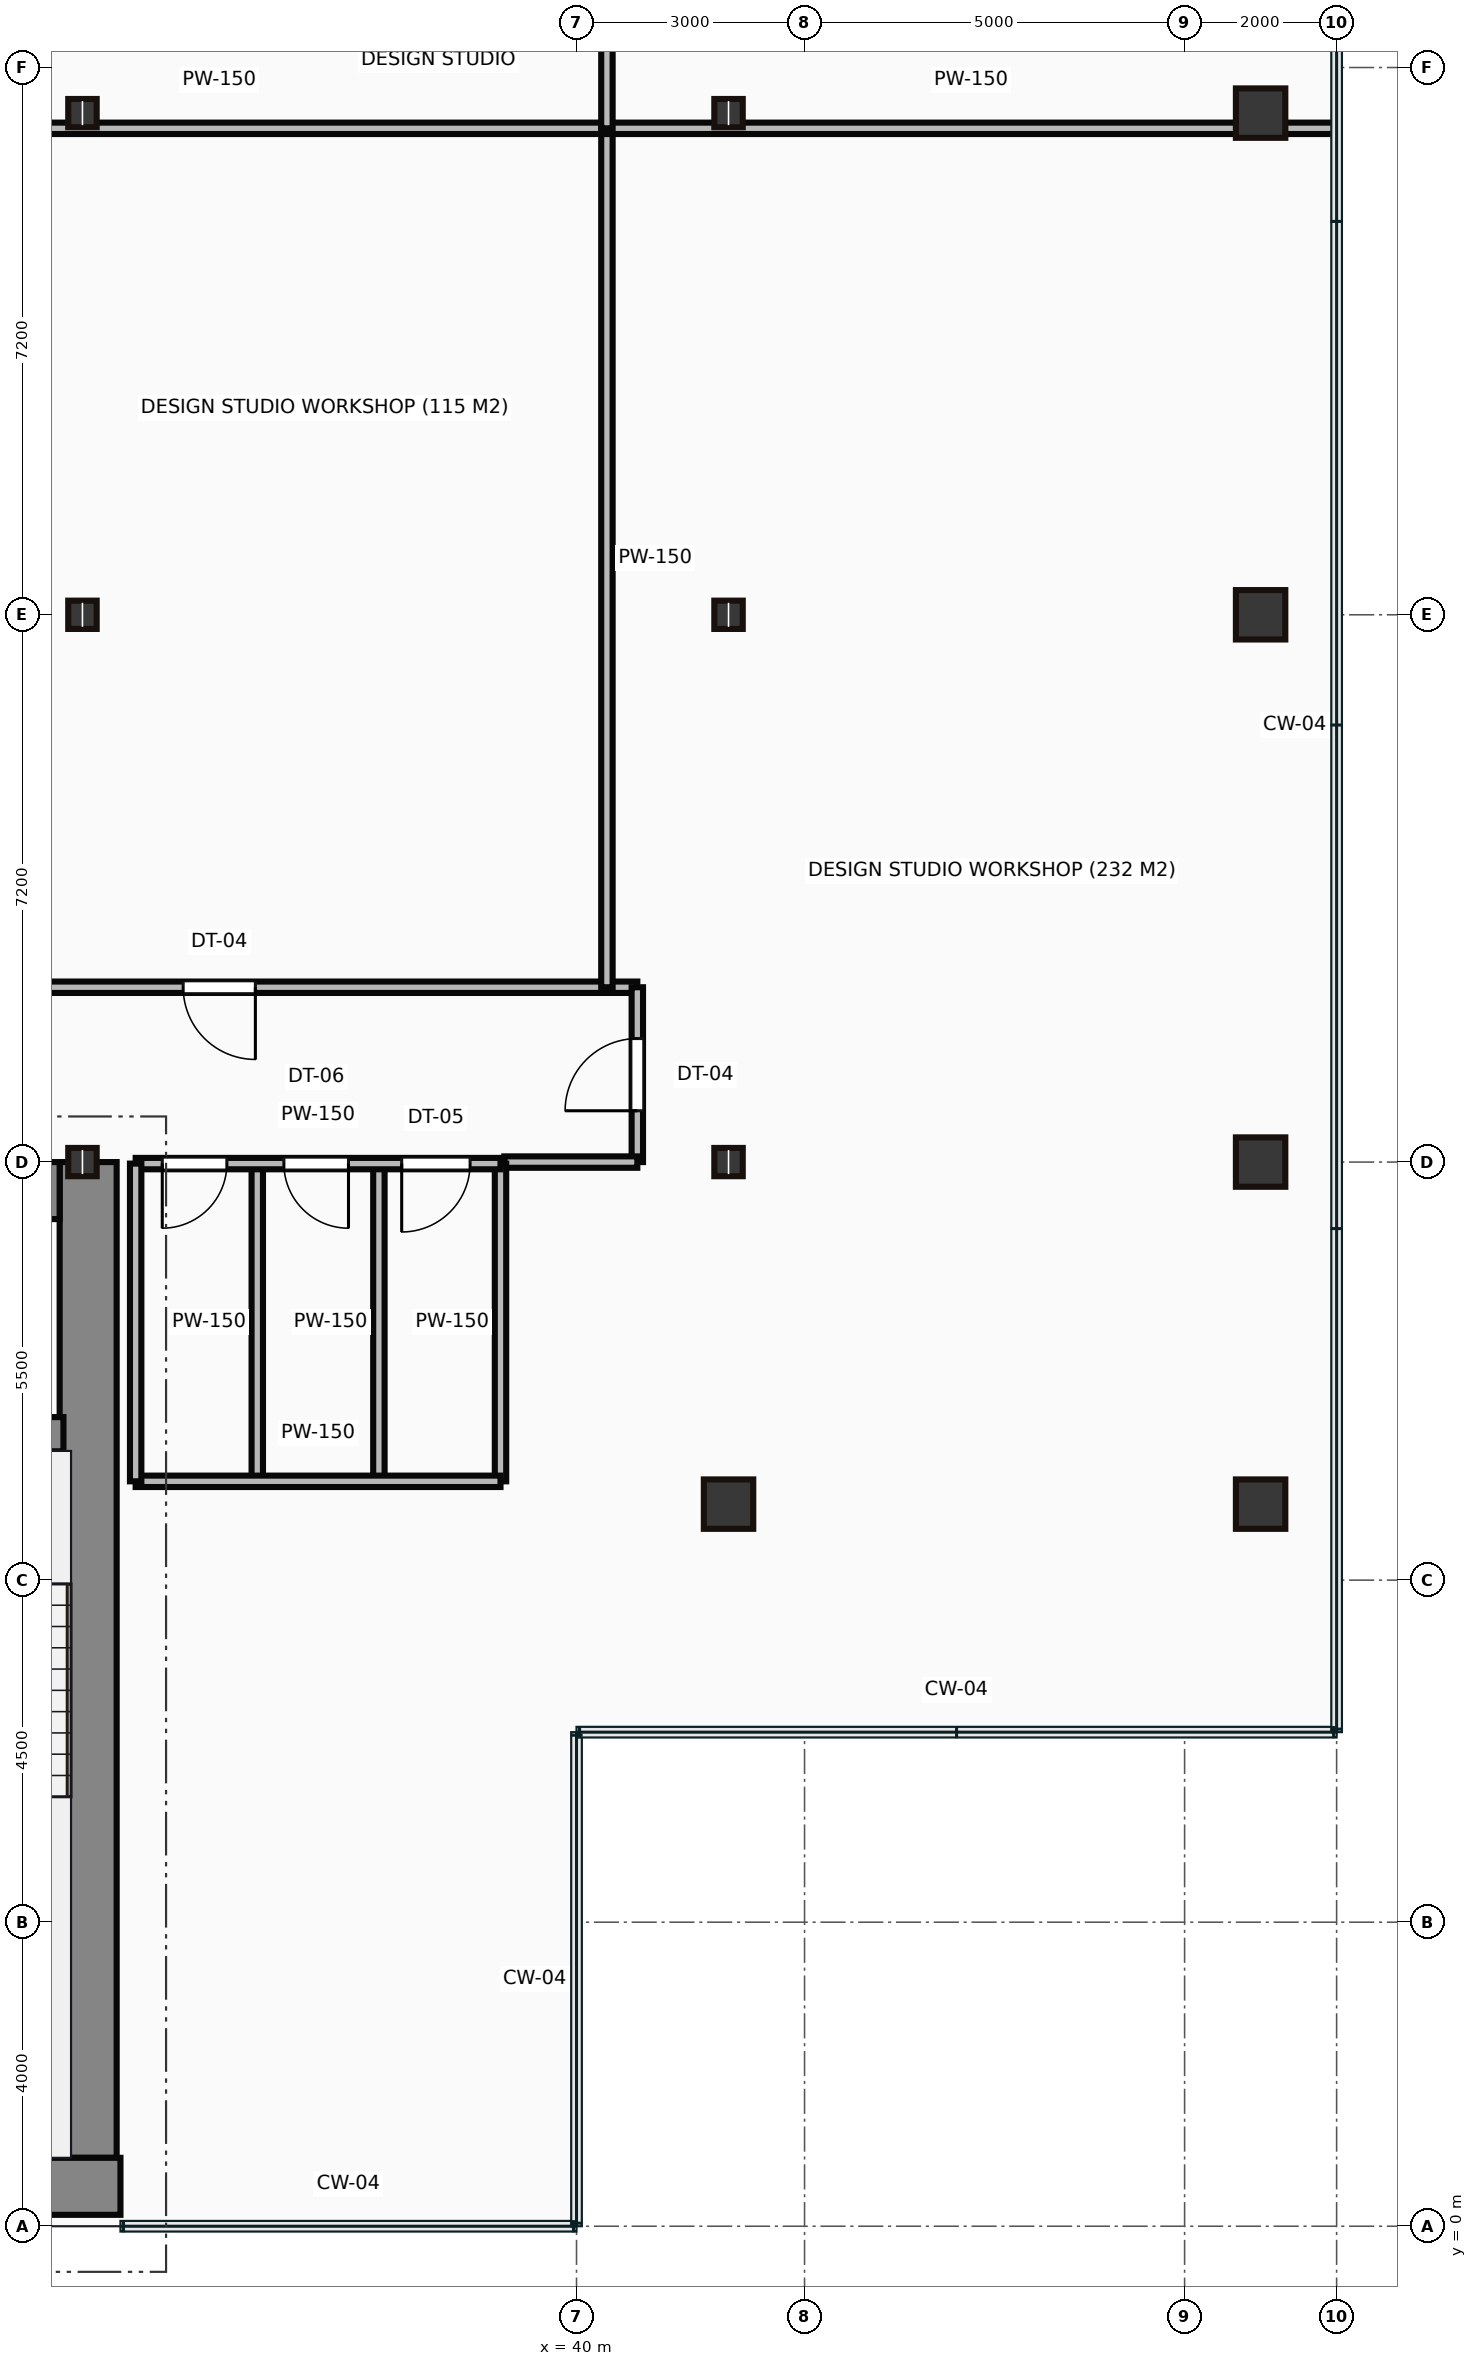
"""IFC4 building model, lengths in metres.
Left out: names, types, materials, properties, quantities, classifications, styles, units other than length and angle.
Written with IfcOpenShell. Run it as: python <this file> out.ifc"""

import sys

from ifc_helpers import new_model, si_unit, direction, frame, frame_2d, origin, origin_2d, place, context, subcontext, project, spatial, rectangle, hollow_rectangle, i_section, extrude, source, transform, mapped, element, fill, save


model = new_model("IFC4")
c1 = context("Model", 3, precision=1e-05, world=origin(), true_north=direction((0.0, 1.0)))
c2 = subcontext(c1, "Body", "Model", "MODEL_VIEW")
j1 = project(units=[si_unit("LENGTHUNIT", "METRE"), si_unit("PLANEANGLEUNIT", "RADIAN")], contexts=[c1])
p1 = place(None, origin())
s1 = spatial("IfcSite", under=j1, at=p1, CompositionType="ELEMENT")
p2 = place(p1, origin())
s2 = spatial("IfcBuilding", under=s1, at=p2, CompositionType="ELEMENT")
p3 = place(p2, frame((0.0, 0.0, 158.85)))
s3 = spatial("IfcBuildingStorey", under=s2, at=p3, CompositionType="ELEMENT", Elevation=158.85)
m1 = source(origin(), c2, "Body", "SweptSolid", [
    extrude(rectangle(XDim=29.5, YDim=0.75, at=frame_2d((14.75, 0.0))), origin(), (0.0, 0.0, 1.0), 3.65),
])
p4 = place(p3, frame((4.5, 0.525, 0.0), z_axis=(0.0, 0.0, 1.0), x_axis=(1.0, 0.0, 0.0)))
e1 = element("IfcWall", 1, at=p4, inside=s3, PredefinedType="SHEAR", context=c2, shape_type="MappedRepresentation", body=[
    mapped(m1, transform((0.0, 0.0, 0.0))),
])
m2 = source(origin(), c2, "Body", "SweptSolid", [
    extrude(rectangle(XDim=13.1, YDim=0.75, at=frame_2d((6.55, 0.0))), origin(), (0.0, 0.0, 1.0), 3.65),
])
p5 = place(p3, frame((33.575, 0.9, 0.0), z_axis=(0.0, 0.0, 1.0), x_axis=(0.0, 1.0, 0.0)))
e2 = element("IfcWall", 2, at=p5, inside=s3, PredefinedType="SHEAR", context=c2, shape_type="MappedRepresentation", body=[
    mapped(m2, transform((0.0, 0.0, 0.0))),
])
m3 = source(origin(), c2, "Body", "SweptSolid", [
    extrude(rectangle(XDim=12.6, YDim=0.75, at=frame_2d((6.3, 0.0))), origin(), (0.0, 0.0, 1.0), 3.65),
])
p6 = place(p3, frame((20.6, 13.625, 0.0), z_axis=(0.0, 0.0, 1.0), x_axis=(1.0, 0.0, 0.0)))
e3 = element("IfcWall", 3, at=p6, inside=s3, PredefinedType="SHEAR", context=c2, shape_type="MappedRepresentation", body=[
    mapped(m3, transform((0.0, 0.0, 0.0))),
])
p7 = place(p6, frame((9.25, 0.0, 0.0)))
e4 = element("IfcOpeningElement", 4, at=p7, cuts=e3, PredefinedType="OPENING", context=c2, shape_type="SweptSolid", body=[
    extrude(rectangle(XDim=1.1, YDim=2.15, at=frame_2d((0.55, 1.075))), frame((0.0, 0.385, 0.0), z_axis=(0.0, -1.0, 0.0), x_axis=(1.0, 0.0, 0.0)), (0.0, 0.0, 1.0), 0.77),
])
m4 = source(origin(), c2, "Body", "SweptSolid", [
    extrude(rectangle(XDim=3.39, YDim=0.45, at=frame_2d((1.695, 0.0))), origin(), (0.0, 0.0, 1.0), 3.65),
])
p8 = place(p3, frame((29.86, 10.42, 0.0), z_axis=(0.0, 0.0, 1.0), x_axis=(1.0, 0.0, 0.0)))
e5 = element("IfcWall", 5, at=p8, inside=s3, PredefinedType="SHEAR", context=c2, shape_type="MappedRepresentation", body=[
    mapped(m4, transform((0.0, 0.0, 0.0))),
])
p9 = place(p8, frame((1.1, 0.0, 0.0)))
e6 = element("IfcOpeningElement", 6, at=p9, cuts=e5, PredefinedType="OPENING", context=c2, shape_type="SweptSolid", body=[
    extrude(rectangle(XDim=1.1, YDim=2.15, at=frame_2d((0.55, 1.075))), frame((0.0, 0.235, 0.0), z_axis=(0.0, -1.0, 0.0), x_axis=(1.0, 0.0, 0.0)), (0.0, 0.0, 1.0), 0.47),
])
m5 = source(origin(), c2, "Body", "SweptSolid", [
    extrude(i_section(OverallWidth=0.374, OverallDepth=0.372, WebThickness=0.016, FlangeThickness=0.026, at=origin_2d()), origin(), (0.0, 0.0, 1.0), 3.65),
])
for number, where, z_axis, x_axis in (
    (7, (33.5, 14.0, 0.0), (0.0, 0.0, 1.0), (1.0, 0.0, 0.0)),
    (8, (33.5, 21.2, 0.0), (0.0, 0.0, 1.0), (1.0, 0.0, 0.0)),
    (9, (33.5, 27.8, 0.0), (0.0, 0.0, 1.0), (1.0, 0.0, 0.0)),
):
    element("IfcColumn", number, at=place(p3, frame(where, z_axis=z_axis, x_axis=x_axis)), inside=s3, PredefinedType="COLUMN", context=c2, shape_type="MappedRepresentation", body=[
        mapped(m5, transform((0.0, 0.0, 0.0))),
    ])
m6 = source(origin(), c2, "Body", "SweptSolid", [
    extrude(hollow_rectangle(XDim=0.65, YDim=0.65, WallThickness=0.032, at=origin_2d()), origin(), (0.0, 0.0, 1.0), 3.65),
])
p10 = place(p3, frame((42.0, 9.5, 0.0), z_axis=(0.0, 0.0, 1.0), x_axis=(1.0, 0.0, 0.0)))
e10 = element("IfcColumn", 10, at=p10, inside=s3, PredefinedType="COLUMN", context=c2, shape_type="MappedRepresentation", body=[
    mapped(m6, transform((0.0, 0.0, 0.0))),
])
for number, where, z_axis, x_axis in (
    (11, (42.0, 14.0, 0.0), (0.0, 0.0, 1.0), (1.0, 0.0, 0.0)),
    (12, (42.0, 21.2, 0.0), (0.0, 0.0, 1.0), (1.0, 0.0, 0.0)),
    (13, (42.0, 27.8, 0.0), (0.0, 0.0, 1.0), (1.0, 0.0, 0.0)),
):
    element("IfcColumn", number, at=place(p3, frame(where, z_axis=z_axis, x_axis=x_axis)), inside=s3, PredefinedType="COLUMN", context=c2, shape_type="MappedRepresentation", body=[
        mapped(m5, transform((0.0, 0.0, 0.0))),
    ])
for number, where, z_axis, x_axis in (
    (14, (49.0, 9.5, 0.0), (0.0, 0.0, 1.0), (1.0, 0.0, 0.0)),
    (15, (49.0, 14.0, 0.0), (0.0, 0.0, 1.0), (1.0, 0.0, 0.0)),
    (16, (49.0, 21.2, 0.0), (0.0, 0.0, 1.0), (1.0, 0.0, 0.0)),
    (17, (49.0, 27.8, 0.0), (0.0, 0.0, 1.0), (1.0, 0.0, 0.0)),
):
    element("IfcColumn", number, at=place(p3, frame(where, z_axis=z_axis, x_axis=x_axis)), inside=s3, PredefinedType="COLUMN", context=c2, shape_type="MappedRepresentation", body=[
        mapped(m6, transform((0.0, 0.0, 0.0))),
    ])
m7 = source(origin(), c2, "Body", "SweptSolid", [
    extrude(rectangle(XDim=4.8, YDim=0.15, at=frame_2d((2.4, 0.0))), origin(), (0.0, 0.0, 1.0), 2.76),
])
p11 = place(p3, frame((34.2, 13.98, 0.0), z_axis=(0.0, 0.0, 1.0), x_axis=(1.0, 0.0, 0.0)))
e18 = element("IfcWall", 18, at=p11, inside=s3, PredefinedType="PARTITIONING", context=c2, shape_type="MappedRepresentation", body=[
    mapped(m7, transform((0.0, 0.0, 0.0))),
])
p12 = place(p11, frame((0.35, 0.0, 0.0)))
e19 = element("IfcOpeningElement", 19, at=p12, cuts=e18, PredefinedType="OPENING", context=c2, shape_type="SweptSolid", body=[
    extrude(rectangle(XDim=0.85, YDim=2.1, at=frame_2d((0.425, 1.05))), frame((0.0, 0.085, 0.0), z_axis=(0.0, -1.0, 0.0), x_axis=(1.0, 0.0, 0.0)), (0.0, 0.0, 1.0), 0.17),
])
p13 = place(p11, frame((1.95, 0.0, 0.0)))
e20 = element("IfcOpeningElement", 20, at=p13, cuts=e18, PredefinedType="OPENING", context=c2, shape_type="SweptSolid", body=[
    extrude(rectangle(XDim=0.85, YDim=2.1, at=frame_2d((0.425, 1.05))), frame((0.0, 0.085, 0.0), z_axis=(0.0, -1.0, 0.0), x_axis=(1.0, 0.0, 0.0)), (0.0, 0.0, 1.0), 0.17),
])
p14 = place(p11, frame((3.5, 0.0, 0.0)))
e21 = element("IfcOpeningElement", 21, at=p14, cuts=e18, PredefinedType="OPENING", context=c2, shape_type="SweptSolid", body=[
    extrude(rectangle(XDim=0.9, YDim=2.1, at=frame_2d((0.45, 1.05))), frame((0.0, 0.085, 0.0), z_axis=(0.0, -1.0, 0.0), x_axis=(1.0, 0.0, 0.0)), (0.0, 0.0, 1.0), 0.17),
])
m8 = source(origin(), c2, "Body", "SweptSolid", [
    extrude(rectangle(XDim=4.8, YDim=0.15, at=frame_2d((2.4, 0.0))), origin(), (0.0, 0.0, 1.0), 3.4),
])
p15 = place(p3, frame((34.2, 9.8, 0.0), z_axis=(0.0, 0.0, 1.0), x_axis=(1.0, 0.0, 0.0)))
e22 = element("IfcWall", 22, at=p15, inside=s3, PredefinedType="PARTITIONING", context=c2, shape_type="MappedRepresentation", body=[
    mapped(m8, transform((0.0, 0.0, 0.0))),
])
m9 = source(origin(), c2, "Body", "SweptSolid", [
    extrude(rectangle(XDim=4.18, YDim=0.15, at=frame_2d((2.09, 0.0))), origin(), (0.0, 0.0, 1.0), 3.4),
])
for number, where, z_axis, x_axis in (
    (23, (39.0, 9.8, 0.0), (0.0, 0.0, 1.0), (0.0, 1.0, 0.0)),
    (24, (34.2, 9.8, 0.0), (0.0, 0.0, 1.0), (0.0, 1.0, 0.0)),
    (25, (35.8, 9.8, 0.0), (0.0, 0.0, 1.0), (0.0, 1.0, 0.0)),
    (26, (37.4, 9.8, 0.0), (0.0, 0.0, 1.0), (0.0, 1.0, 0.0)),
):
    element("IfcWall", number, at=place(p3, frame(where, z_axis=z_axis, x_axis=x_axis)), inside=s3, PredefinedType="PARTITIONING", context=c2, shape_type="MappedRepresentation", body=[
        mapped(m9, transform((0.0, 0.0, 0.0))),
    ])
m10 = source(origin(), c2, "Body", "SweptSolid", [
    extrude(rectangle(XDim=21.75, YDim=0.15, at=frame_2d((10.875, 0.0))), origin(), (0.0, 0.0, 1.0), 3.4),
])
p16 = place(p3, frame((19.05, 16.3, 0.0), z_axis=(0.0, 0.0, 1.0), x_axis=(1.0, 0.0, 0.0)))
e27 = element("IfcWall", 27, at=p16, inside=s3, PredefinedType="PARTITIONING", context=c2, shape_type="MappedRepresentation", body=[
    mapped(m10, transform((0.0, 0.0, 0.0))),
])
p17 = place(p16, frame((5.975, 0.0, 0.0)))
e28 = element("IfcOpeningElement", 28, at=p17, cuts=e27, PredefinedType="OPENING", context=c2, shape_type="SweptSolid", body=[
    extrude(rectangle(XDim=0.95, YDim=2.15, at=frame_2d((0.475, 1.075))), frame((0.0, 0.085, 0.0), z_axis=(0.0, -1.0, 0.0), x_axis=(1.0, 0.0, 0.0)), (0.0, 0.0, 1.0), 0.17),
])
p18 = place(p16, frame((15.775, 0.0, 0.0)))
e29 = element("IfcOpeningElement", 29, at=p18, cuts=e27, PredefinedType="OPENING", context=c2, shape_type="SweptSolid", body=[
    extrude(rectangle(XDim=0.95, YDim=2.15, at=frame_2d((0.475, 1.075))), frame((0.0, 0.085, 0.0), z_axis=(0.0, -1.0, 0.0), x_axis=(1.0, 0.0, 0.0)), (0.0, 0.0, 1.0), 0.17),
])
m11 = source(origin(), c2, "Body", "SweptSolid", [
    extrude(rectangle(XDim=2.3, YDim=0.15, at=frame_2d((1.15, 0.0))), origin(), (0.0, 0.0, 1.0), 3.4),
])
p19 = place(p3, frame((40.8, 16.3, 0.0), z_axis=(0.0, 0.0, 1.0), x_axis=(0.0, -1.0, 0.0)))
e30 = element("IfcWall", 30, at=p19, inside=s3, PredefinedType="PARTITIONING", context=c2, shape_type="MappedRepresentation", body=[
    mapped(m11, transform((0.0, 0.0, 0.0))),
])
p20 = place(p19, frame((0.675, 0.0, 0.0)))
e31 = element("IfcOpeningElement", 31, at=p20, cuts=e30, PredefinedType="OPENING", context=c2, shape_type="SweptSolid", body=[
    extrude(rectangle(XDim=0.95, YDim=2.15, at=frame_2d((0.475, 1.075))), frame((0.0, 0.085, 0.0), z_axis=(0.0, -1.0, 0.0), x_axis=(1.0, 0.0, 0.0)), (0.0, 0.0, 1.0), 0.17),
])
m12 = source(origin(), c2, "Body", "SweptSolid", [
    extrude(rectangle(XDim=1.75, YDim=0.15, at=frame_2d((0.875, 0.0))), origin(), (0.0, 0.0, 1.0), 2.76),
])
p21 = place(p3, frame((40.8, 14.0, 0.0), z_axis=(0.0, 0.0, 1.0), x_axis=(-1.0, 0.0, 0.0)))
e32 = element("IfcWall", 32, at=p21, inside=s3, PredefinedType="PARTITIONING", context=c2, shape_type="MappedRepresentation", body=[
    mapped(m12, transform((0.0, 0.0, 0.0))),
])
m13 = source(origin(), c2, "Body", "SweptSolid", [
    extrude(rectangle(XDim=10.2, YDim=0.15, at=frame_2d((5.1, 0.0))), origin(), (0.0, 0.0, 1.0), 3.4),
])
p22 = place(p3, frame((30.2, 27.6, 0.0), z_axis=(0.0, 0.0, 1.0), x_axis=(1.0, 0.0, 0.0)))
e33 = element("IfcWall", 33, at=p22, inside=s3, PredefinedType="PARTITIONING", context=c2, shape_type="MappedRepresentation", body=[
    mapped(m13, transform((0.0, 0.0, 0.0))),
])
m14 = source(origin(), c2, "Body", "SweptSolid", [
    extrude(rectangle(XDim=11.3, YDim=0.15, at=frame_2d((5.65, 0.0))), origin(), (0.0, 0.0, 1.0), 3.4),
])
p23 = place(p3, frame((40.4, 27.6, 0.0), z_axis=(0.0, 0.0, 1.0), x_axis=(0.0, -1.0, 0.0)))
e34 = element("IfcWall", 34, at=p23, inside=s3, PredefinedType="PARTITIONING", context=c2, shape_type="MappedRepresentation", body=[
    mapped(m14, transform((0.0, 0.0, 0.0))),
])
m15 = source(origin(), c2, "Body", "SweptSolid", [
    extrude(rectangle(XDim=9.58, YDim=0.15, at=frame_2d((4.79, 0.0))), origin(), (0.0, 0.0, 1.0), 3.4),
])
p24 = place(p3, frame((40.4, 27.6, 0.0), z_axis=(0.0, 0.0, 1.0), x_axis=(1.0, 0.0, 0.0)))
e35 = element("IfcWall", 35, at=p24, inside=s3, PredefinedType="PARTITIONING", context=c2, shape_type="MappedRepresentation", body=[
    mapped(m15, transform((0.0, 0.0, 0.0))),
])
m16 = source(origin(), c2, "Body", "SweptSolid", [
    extrude(rectangle(XDim=1.8, YDim=0.15, at=frame_2d((0.9, 0.0))), origin(), (0.0, 0.0, 1.0), 3.4),
])
p25 = place(p3, frame((40.4, 29.4, 0.0), z_axis=(0.0, 0.0, 1.0), x_axis=(0.0, -1.0, 0.0)))
e36 = element("IfcWall", 36, at=p25, inside=s3, PredefinedType="PARTITIONING", context=c2, shape_type="MappedRepresentation", body=[
    mapped(m16, transform((0.0, 0.0, 0.0))),
])
m17 = source(origin(), c2, "Body", "SweptSolid", [
    extrude(rectangle(XDim=0.85, YDim=2.1, at=frame_2d((0.425, 1.05))), frame((0.0, 0.025, 0.0), z_axis=(0.0, -1.0, 0.0), x_axis=(1.0, 0.0, 0.0)), (0.0, 0.0, 1.0), 0.05),
])
p26 = place(p12, frame((0.85, 0.0, 0.0), z_axis=(0.0, 0.0, 1.0), x_axis=(-1.0, 0.0, 0.0)))
e37 = element("IfcDoor", 37, at=p26, inside=s3, OperationType="SINGLE_SWING_LEFT", PredefinedType="DOOR", context=c2, shape_type="MappedRepresentation", body=[
    mapped(m17, transform((0.0, 0.0, 0.0))),
])
fill(e19, e37)
p27 = place(p13, frame((0.85, 0.0, 0.0), z_axis=(0.0, 0.0, 1.0), x_axis=(-1.0, 0.0, 0.0)))
e38 = element("IfcDoor", 38, at=p27, inside=s3, OperationType="SINGLE_SWING_RIGHT", PredefinedType="DOOR", context=c2, shape_type="MappedRepresentation", body=[
    mapped(m17, transform((0.0, 0.0, 0.0))),
])
fill(e20, e38)
m18 = source(origin(), c2, "Body", "SweptSolid", [
    extrude(rectangle(XDim=0.9, YDim=2.1, at=frame_2d((0.45, 1.05))), frame((0.0, 0.025, 0.0), z_axis=(0.0, -1.0, 0.0), x_axis=(1.0, 0.0, 0.0)), (0.0, 0.0, 1.0), 0.05),
])
p28 = place(p14, frame((0.9, 0.0, 0.0), z_axis=(0.0, 0.0, 1.0), x_axis=(-1.0, 0.0, 0.0)))
e39 = element("IfcDoor", 39, at=p28, inside=s3, OperationType="SINGLE_SWING_LEFT", PredefinedType="DOOR", context=c2, shape_type="MappedRepresentation", body=[
    mapped(m18, transform((0.0, 0.0, 0.0))),
])
fill(e21, e39)
m19 = source(origin(), c2, "Body", "SweptSolid", [
    extrude(rectangle(XDim=0.95, YDim=2.15, at=frame_2d((0.475, 1.075))), frame((0.0, 0.025, 0.0), z_axis=(0.0, -1.0, 0.0), x_axis=(1.0, 0.0, 0.0)), (0.0, 0.0, 1.0), 0.05),
])
p29 = place(p18, origin())
e40 = element("IfcDoor", 40, at=p29, inside=s3, OperationType="SINGLE_SWING_RIGHT", PredefinedType="DOOR", context=c2, shape_type="MappedRepresentation", body=[
    mapped(m19, transform((0.0, 0.0, 0.0))),
])
fill(e29, e40)
p30 = place(p20, origin())
e41 = element("IfcDoor", 41, at=p30, inside=s3, OperationType="SINGLE_SWING_RIGHT", PredefinedType="DOOR", context=c2, shape_type="MappedRepresentation", body=[
    mapped(m19, transform((0.0, 0.0, 0.0))),
])
fill(e31, e41)
save(model, sys.argv[1])
